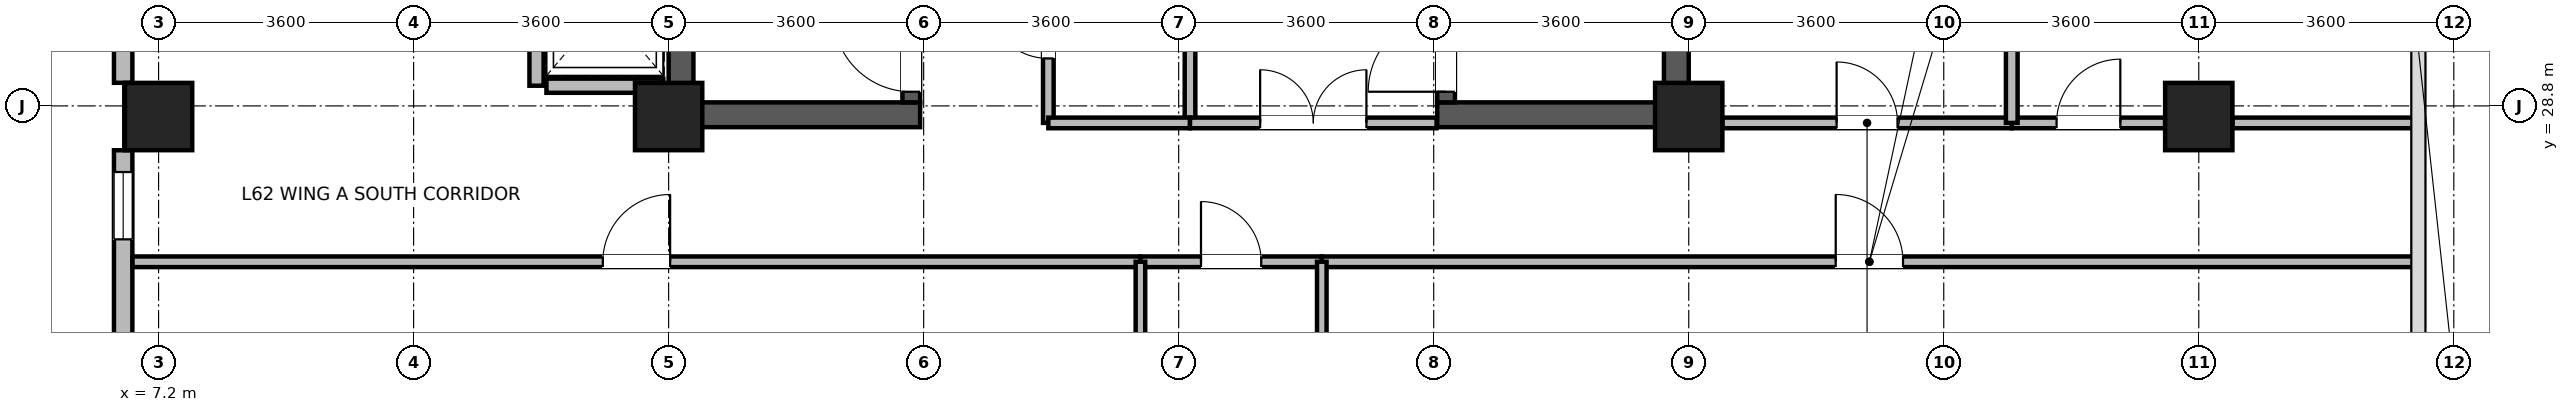
"""IFC4 building model, lengths in metres.
Left out: names, types, materials, properties, quantities, classifications, styles, units other than length and angle.
Written with IfcOpenShell. Run it as: python <this file> out.ifc"""

import sys

from ifc_helpers import new_model, si_unit, direction, frame, frame_2d, origin, origin_2d, place, context, subcontext, project, spatial, rectangle, extrude, source, transform, mapped, element, fill, save


model = new_model("IFC4")
c1 = context("Model", 3, precision=1e-05, world=origin(), true_north=direction((0.0, 1.0)))
c2 = subcontext(c1, "Body", "Model", "MODEL_VIEW")
j1 = project(units=[si_unit("LENGTHUNIT", "METRE"), si_unit("PLANEANGLEUNIT", "RADIAN")], contexts=[c1])
p1 = place(None, origin())
s1 = spatial("IfcSite", under=j1, at=p1, CompositionType="ELEMENT")
p2 = place(p1, origin())
s2 = spatial("IfcBuilding", under=s1, at=p2, CompositionType="ELEMENT")
p3 = place(p2, frame((0.0, 0.0, 242.5)))
s3 = spatial("IfcBuildingStorey", under=s2, at=p3, CompositionType="ELEMENT", Elevation=242.5)
for number, where, z_axis, x_axis in (
    (1, (14.575, 28.5, 0.0), (0.0, 0.0, 1.0), (0.0, 1.0, 0.0)),
    (2, (28.625, 28.5, 0.0), (0.0, 0.0, 1.0), (0.0, 1.0, 0.0)),
):
    element("IfcWall", number, at=place(p3, frame(where, z_axis=z_axis, x_axis=x_axis)), inside=s3, PredefinedType="SHEAR", context=c2, shape_type="SweptSolid", body=[
        extrude(rectangle(XDim=7.7, YDim=0.35, at=frame_2d((3.85, 0.0))), origin(), (0.0, 0.0, 1.0), 3.44),
    ])
for number, where, z_axis, x_axis in (
    (3, (14.75, 28.675, 0.0), (0.0, 0.0, 1.0), (1.0, 0.0, 0.0)),
    (4, (25.25, 28.675, 0.0), (0.0, 0.0, 1.0), (1.0, 0.0, 0.0)),
):
    element("IfcWall", number, at=place(p3, frame(where, z_axis=z_axis, x_axis=x_axis)), inside=s3, PredefinedType="SHEAR", context=c2, shape_type="SweptSolid", body=[
        extrude(rectangle(XDim=3.2, YDim=0.35, at=frame_2d((1.6, 0.0))), origin(), (0.0, 0.0, 1.0), 3.44),
    ])
p4 = place(p3, frame((17.825, 28.85, 0.0), z_axis=(0.0, 0.0, 1.0), x_axis=(0.0, 1.0, 0.0)))
e5 = element("IfcWall", 5, at=p4, inside=s3, PredefinedType="SHEAR", context=c2, shape_type="SweptSolid", body=[
    extrude(rectangle(XDim=7.0, YDim=0.25, at=frame_2d((3.5, 0.0))), origin(), (0.0, 0.0, 1.0), 3.44),
])
p5 = place(p4, frame((0.15, 0.0, 0.0)))
e6 = element("IfcOpeningElement", 6, at=p5, cuts=e5, PredefinedType="OPENING", context=c2, shape_type="SweptSolid", body=[
    extrude(rectangle(XDim=1.1, YDim=2.08, at=frame_2d((0.55, 1.04))), frame((0.0, 0.135, 0.0), z_axis=(0.0, -1.0, 0.0), x_axis=(1.0, 0.0, 0.0)), (0.0, 0.0, 1.0), 0.27),
])
p6 = place(p3, frame((25.375, 28.85, 0.0), z_axis=(0.0, 0.0, 1.0), x_axis=(0.0, 1.0, 0.0)))
e7 = element("IfcWall", 7, at=p6, inside=s3, PredefinedType="SHEAR", context=c2, shape_type="SweptSolid", body=[
    extrude(rectangle(XDim=7.0, YDim=0.25, at=frame_2d((3.5, 0.0))), origin(), (0.0, 0.0, 1.0), 3.44),
])
p7 = place(p6, frame((0.15, 0.0, 0.0)))
e8 = element("IfcOpeningElement", 8, at=p7, cuts=e7, PredefinedType="OPENING", context=c2, shape_type="SweptSolid", body=[
    extrude(rectangle(XDim=1.1, YDim=2.08, at=frame_2d((0.55, 1.04))), frame((0.0, 0.135, 0.0), z_axis=(0.0, -1.0, 0.0), x_axis=(1.0, 0.0, 0.0)), (0.0, 0.0, 1.0), 0.27),
])
m1 = source(origin(), c2, "Body", "SweptSolid", [
    extrude(rectangle(XDim=0.95, YDim=0.95, at=origin_2d()), origin(), (0.0, 0.0, 1.0), 3.7),
])
for number, where, z_axis, x_axis in (
    (9, (7.2, 28.65, 0.0), (0.0, 0.0, 1.0), (1.0, 0.0, 0.0)),
    (10, (14.4, 28.65, 0.0), (0.0, 0.0, 1.0), (1.0, 0.0, 0.0)),
    (11, (28.8, 28.65, 0.0), (0.0, 0.0, 1.0), (1.0, 0.0, 0.0)),
    (12, (36.0, 28.65, 0.0), (0.0, 0.0, 1.0), (1.0, 0.0, 0.0)),
):
    element("IfcColumn", number, at=place(p3, frame(where, z_axis=z_axis, x_axis=x_axis)), inside=s3, PredefinedType="COLUMN", context=c2, shape_type="MappedRepresentation", body=[
        mapped(m1, transform((0.0, 0.0, 0.0), x_axis=(1.0, 0.0, 0.0), y_axis=(0.0, 1.0, 0.0), z_axis=(0.0, 0.0, 1.0), scale=1.0)),
    ])
p8 = place(p3, frame((6.7, 29.126, 0.0), z_axis=(0.0, 0.0, 1.0), x_axis=(0.0, 1.0, 0.0)))
e13 = element("IfcWall", 13, at=p8, inside=s3, PredefinedType="STANDARD", context=c2, shape_type="SweptSolid", body=[
    extrude(rectangle(XDim=6.548, YDim=0.26, at=frame_2d((3.274, 0.0))), origin(), (0.0, 0.0, 1.0), 3.42),
])
p9 = place(p8, frame((1.037, 0.0, 0.85)))
e14 = element("IfcOpeningElement", 14, at=p9, cuts=e13, PredefinedType="OPENING", context=c2, shape_type="SweptSolid", body=[
    extrude(rectangle(XDim=1.2, YDim=1.75, at=frame_2d((0.6, 0.875))), frame((0.0, 0.14, 0.0), z_axis=(0.0, -1.0, 0.0), x_axis=(1.0, 0.0, 0.0)), (0.0, 0.0, 1.0), 0.28),
])
p10 = place(p8, frame((4.311, 0.0, 0.85)))
e15 = element("IfcOpeningElement", 15, at=p10, cuts=e13, PredefinedType="OPENING", context=c2, shape_type="SweptSolid", body=[
    extrude(rectangle(XDim=1.2, YDim=1.75, at=frame_2d((0.6, 0.875))), frame((0.0, 0.14, 0.0), z_axis=(0.0, -1.0, 0.0), x_axis=(1.0, 0.0, 0.0)), (0.0, 0.0, 1.0), 0.28),
])
p11 = place(p3, frame((6.7, 25.07, 0.0), z_axis=(0.0, 0.0, 1.0), x_axis=(0.0, 1.0, 0.0)))
e16 = element("IfcWall", 16, at=p11, inside=s3, PredefinedType="STANDARD", context=c2, shape_type="SweptSolid", body=[
    extrude(rectangle(XDim=3.104, YDim=0.26, at=frame_2d((1.552, 0.0))), origin(), (0.0, 0.0, 1.0), 3.42),
])
p12 = place(p11, frame((1.847, 0.0, 0.85)))
e17 = element("IfcOpeningElement", 17, at=p12, cuts=e16, PredefinedType="OPENING", context=c2, shape_type="SweptSolid", body=[
    extrude(rectangle(XDim=0.95, YDim=1.75, at=frame_2d((0.475, 0.875))), frame((0.0, 0.14, 0.0), z_axis=(0.0, -1.0, 0.0), x_axis=(1.0, 0.0, 0.0)), (0.0, 0.0, 1.0), 0.28),
])
p13 = place(p3, frame((12.675, 29.085, 0.0), z_axis=(0.0, 0.0, 1.0), x_axis=(1.0, 0.0, 0.0)))
e18 = element("IfcWall", 18, at=p13, inside=s3, PredefinedType="PARTITIONING", context=c2, shape_type="SweptSolid", body=[
    extrude(rectangle(XDim=1.65, YDim=0.2, at=frame_2d((0.825, 0.0))), origin(), (0.0, 0.0, 1.0), 3.42),
])
p14 = place(p3, frame((12.535, 29.085, 0.0), z_axis=(0.0, 0.0, 1.0), x_axis=(0.0, 1.0, 0.0)))
e19 = element("IfcWall", 19, at=p14, inside=s3, PredefinedType="PARTITIONING", context=c2, shape_type="SweptSolid", body=[
    extrude(rectangle(XDim=2.23, YDim=0.2, at=frame_2d((1.115, 0.0))), origin(), (0.0, 0.0, 1.0), 3.42),
])
p15 = place(p3, frame((23.62, 26.6, 0.0), z_axis=(0.0, 0.0, 1.0), x_axis=(1.0, 0.0, 0.0)))
e20 = element("IfcWall", 20, at=p15, inside=s3, PredefinedType="PARTITIONING", context=c2, shape_type="SweptSolid", body=[
    extrude(rectangle(XDim=15.46, YDim=0.15, at=frame_2d((7.73, 0.0))), origin(), (0.0, 0.0, 1.0), 3.42),
])
p16 = place(p15, frame((7.255, 0.0, 0.0)))
e21 = element("IfcOpeningElement", 21, at=p16, cuts=e20, PredefinedType="OPENING", context=c2, shape_type="SweptSolid", body=[
    extrude(rectangle(XDim=0.95, YDim=2.1, at=frame_2d((0.475, 1.05))), frame((0.0, 0.085, 0.0), z_axis=(0.0, -1.0, 0.0), x_axis=(1.0, 0.0, 0.0)), (0.0, 0.0, 1.0), 0.17),
])
p17 = place(p3, frame((6.832, 26.6, 0.0), z_axis=(0.0, 0.0, 1.0), x_axis=(1.0, 0.0, 0.0)))
e22 = element("IfcWall", 22, at=p17, inside=s3, PredefinedType="PARTITIONING", context=c2, shape_type="SweptSolid", body=[
    extrude(rectangle(XDim=14.228, YDim=0.15, at=frame_2d((7.114, 0.0))), origin(), (0.0, 0.0, 1.0), 3.42),
])
p18 = place(p17, frame((6.639, 0.0, 0.0)))
e23 = element("IfcOpeningElement", 23, at=p18, cuts=e22, PredefinedType="OPENING", context=c2, shape_type="SweptSolid", body=[
    extrude(rectangle(XDim=0.95, YDim=2.1, at=frame_2d((0.475, 1.05))), frame((0.0, 0.085, 0.0), z_axis=(0.0, -1.0, 0.0), x_axis=(1.0, 0.0, 0.0)), (0.0, 0.0, 1.0), 0.17),
])
p19 = place(p3, frame((33.36, 28.56, 0.0), z_axis=(0.0, 0.0, 1.0), x_axis=(1.0, 0.0, 0.0)))
e24 = element("IfcWall", 24, at=p19, inside=s3, PredefinedType="PARTITIONING", context=c2, shape_type="SweptSolid", body=[
    extrude(rectangle(XDim=2.165, YDim=0.15, at=frame_2d((1.083, 0.0))), origin(), (0.0, 0.0, 1.0), 2.87),
])
p20 = place(p19, frame((0.633, 0.0, 0.0)))
e25 = element("IfcOpeningElement", 25, at=p20, cuts=e24, PredefinedType="OPENING", context=c2, shape_type="SweptSolid", body=[
    extrude(rectangle(XDim=0.9, YDim=2.08, at=frame_2d((0.45, 1.04))), frame((0.0, 0.085, 0.0), z_axis=(0.0, -1.0, 0.0), x_axis=(1.0, 0.0, 0.0)), (0.0, 0.0, 1.0), 0.17),
])
p21 = place(p3, frame((36.475, 28.56, 0.0), z_axis=(0.0, 0.0, 1.0), x_axis=(1.0, 0.0, 0.0)))
e26 = element("IfcWall", 26, at=p21, inside=s3, PredefinedType="PARTITIONING", context=c2, shape_type="SweptSolid", body=[
    extrude(rectangle(XDim=2.605, YDim=0.15, at=frame_2d((1.302, 0.0))), origin(), (0.0, 0.0, 1.0), 3.42),
])
p22 = place(p3, frame((29.275, 28.56, 0.0), z_axis=(0.0, 0.0, 1.0), x_axis=(1.0, 0.0, 0.0)))
e27 = element("IfcWall", 27, at=p22, inside=s3, PredefinedType="PARTITIONING", context=c2, shape_type="SweptSolid", body=[
    extrude(rectangle(XDim=4.085, YDim=0.15, at=frame_2d((2.042, 0.0))), origin(), (0.0, 0.0, 1.0), 2.87),
])
p23 = place(p22, frame((1.613, 0.0, 0.0)))
e28 = element("IfcOpeningElement", 28, at=p23, cuts=e27, PredefinedType="OPENING", context=c2, shape_type="SweptSolid", body=[
    extrude(rectangle(XDim=0.86, YDim=2.02, at=frame_2d((0.43, 1.01))), frame((0.0, 0.085, 0.0), z_axis=(0.0, -1.0, 0.0), x_axis=(1.0, 0.0, 0.0)), (0.0, 0.0, 1.0), 0.17),
])
p24 = place(p3, frame((19.76, 28.56, 0.0), z_axis=(0.0, 0.0, 1.0), x_axis=(0.0, 1.0, 0.0)))
e29 = element("IfcWall", 29, at=p24, inside=s3, PredefinedType="PARTITIONING", context=c2, shape_type="SweptSolid", body=[
    extrude(rectangle(XDim=2.68, YDim=0.15, at=frame_2d((1.34, 0.0))), origin(), (0.0, 0.0, 1.0), 3.42),
])
p25 = place(p24, frame((0.91, 0.0, 0.0)))
e30 = element("IfcOpeningElement", 30, at=p25, cuts=e29, PredefinedType="OPENING", context=c2, shape_type="SweptSolid", body=[
    extrude(rectangle(XDim=0.86, YDim=2.02, at=frame_2d((0.43, 1.01))), frame((0.0, 0.085, 0.0), z_axis=(0.0, -1.0, 0.0), x_axis=(1.0, 0.0, 0.0)), (0.0, 0.0, 1.0), 0.17),
])
p26 = place(p3, frame((21.76, 28.56, 0.0), z_axis=(0.0, 0.0, 1.0), x_axis=(0.0, 1.0, 0.0)))
e31 = element("IfcWall", 31, at=p26, inside=s3, PredefinedType="PARTITIONING", context=c2, shape_type="SweptSolid", body=[
    extrude(rectangle(XDim=2.68, YDim=0.15, at=frame_2d((1.34, 0.0))), origin(), (0.0, 0.0, 1.0), 3.42),
])
p27 = place(p3, frame((21.06, 26.6, 0.0), z_axis=(0.0, 0.0, 1.0), x_axis=(1.0, 0.0, 0.0)))
e32 = element("IfcWall", 32, at=p27, inside=s3, PredefinedType="PARTITIONING", context=c2, shape_type="SweptSolid", body=[
    extrude(rectangle(XDim=2.56, YDim=0.15, at=frame_2d((1.28, 0.0))), origin(), (0.0, 0.0, 1.0), 3.42),
])
p28 = place(p27, frame((0.855, 0.0, 0.0)))
e33 = element("IfcOpeningElement", 33, at=p28, cuts=e32, PredefinedType="OPENING", context=c2, shape_type="SweptSolid", body=[
    extrude(rectangle(XDim=0.85, YDim=2.04, at=frame_2d((0.425, 1.02))), frame((0.0, 0.085, 0.0), z_axis=(0.0, -1.0, 0.0), x_axis=(1.0, 0.0, 0.0)), (0.0, 0.0, 1.0), 0.17),
])
p29 = place(p3, frame((19.76, 28.56, 0.0), z_axis=(0.0, 0.0, 1.0), x_axis=(1.0, 0.0, 0.0)))
e34 = element("IfcWall", 34, at=p29, inside=s3, PredefinedType="PARTITIONING", context=c2, shape_type="SweptSolid", body=[
    extrude(rectangle(XDim=2.0, YDim=0.15, at=frame_2d((1.0, 0.0))), origin(), (0.0, 0.0, 1.0), 2.52),
])
for number, where, z_axis, x_axis in (
    (35, (21.06, 21.732, 0.0), (0.0, 0.0, 1.0), (0.0, 1.0, 0.0)),
    (36, (23.62, 21.732, 0.0), (0.0, 0.0, 1.0), (0.0, 1.0, 0.0)),
):
    element("IfcWall", number, at=place(p3, frame(where, z_axis=z_axis, x_axis=x_axis)), inside=s3, PredefinedType="PARTITIONING", context=c2, shape_type="SweptSolid", body=[
        extrude(rectangle(XDim=4.868, YDim=0.135, at=frame_2d((2.434, 0.0))), origin(), (0.0, 0.0, 1.0), 3.42),
    ])
p30 = place(p3, frame((21.76, 28.56, 0.0), z_axis=(0.0, 0.0, 1.0), x_axis=(1.0, 0.0, 0.0)))
e37 = element("IfcWall", 37, at=p30, inside=s3, PredefinedType="PARTITIONING", context=c2, shape_type="SweptSolid", body=[
    extrude(rectangle(XDim=3.48, YDim=0.15, at=frame_2d((1.74, 0.0))), origin(), (0.0, 0.0, 1.0), 2.52),
])
p31 = place(p30, frame((0.99, 0.0, 0.0)))
e38 = element("IfcOpeningElement", 38, at=p31, cuts=e37, PredefinedType="OPENING", context=c2, shape_type="SweptSolid", body=[
    extrude(rectangle(XDim=1.5, YDim=2.1, at=frame_2d((0.75, 1.05))), frame((0.0, 0.085, 0.0), z_axis=(0.0, -1.0, 0.0), x_axis=(1.0, 0.0, 0.0)), (0.0, 0.0, 1.0), 0.17),
])
p32 = place(p3, frame((33.36, 28.56, 0.0), z_axis=(0.0, 0.0, 1.0), x_axis=(0.0, 1.0, 0.0)))
e39 = element("IfcWall", 39, at=p32, inside=s3, PredefinedType="PARTITIONING", context=c2, shape_type="SweptSolid", body=[
    extrude(rectangle(XDim=3.08, YDim=0.165, at=frame_2d((1.54, 0.0))), origin(), (0.0, 0.0, 1.0), 3.42),
])
p33 = place(p12, origin())
e40 = element("IfcWindow", 40, at=p33, inside=s3, PartitioningType="SINGLE_PANEL", PredefinedType="WINDOW", context=c2, shape_type="SweptSolid", body=[
    extrude(rectangle(XDim=0.95, YDim=1.75, at=frame_2d((0.475, 0.875))), frame((0.0, 0.03, 0.0), z_axis=(0.0, -1.0, 0.0), x_axis=(1.0, 0.0, 0.0)), (0.0, 0.0, 1.0), 0.06),
])
fill(e17, e40)
p34 = place(p5, origin())
e41 = element("IfcDoor", 41, at=p34, inside=s3, OperationType="SINGLE_SWING_RIGHT", PredefinedType="DOOR", context=c2, shape_type="SweptSolid", body=[
    extrude(rectangle(XDim=1.1, YDim=2.08, at=frame_2d((0.55, 1.04))), frame((0.0, 0.025, 0.0), z_axis=(0.0, -1.0, 0.0), x_axis=(1.0, 0.0, 0.0)), (0.0, 0.0, 1.0), 0.05),
])
fill(e6, e41)
p35 = place(p7, origin())
e42 = element("IfcDoor", 42, at=p35, inside=s3, OperationType="SINGLE_SWING_LEFT", PredefinedType="DOOR", context=c2, shape_type="SweptSolid", body=[
    extrude(rectangle(XDim=1.1, YDim=2.08, at=frame_2d((0.55, 1.04))), frame((0.0, 0.025, 0.0), z_axis=(0.0, -1.0, 0.0), x_axis=(1.0, 0.0, 0.0)), (0.0, 0.0, 1.0), 0.05),
])
fill(e8, e42)
p36 = place(p16, origin())
e43 = element("IfcDoor", 43, at=p36, inside=s3, OperationType="SINGLE_SWING_LEFT", PredefinedType="DOOR", context=c2, shape_type="SweptSolid", body=[
    extrude(rectangle(XDim=0.95, YDim=2.1, at=frame_2d((0.475, 1.05))), frame((0.0, 0.025, 0.0), z_axis=(0.0, -1.0, 0.0), x_axis=(1.0, 0.0, 0.0)), (0.0, 0.0, 1.0), 0.05),
])
fill(e21, e43)
p37 = place(p18, origin())
e44 = element("IfcDoor", 44, at=p37, inside=s3, OperationType="SINGLE_SWING_RIGHT", PredefinedType="DOOR", context=c2, shape_type="SweptSolid", body=[
    extrude(rectangle(XDim=0.95, YDim=2.1, at=frame_2d((0.475, 1.05))), frame((0.0, 0.025, 0.0), z_axis=(0.0, -1.0, 0.0), x_axis=(1.0, 0.0, 0.0)), (0.0, 0.0, 1.0), 0.05),
])
fill(e23, e44)
p38 = place(p20, origin())
e45 = element("IfcDoor", 45, at=p38, inside=s3, OperationType="SINGLE_SWING_RIGHT", PredefinedType="DOOR", context=c2, shape_type="SweptSolid", body=[
    extrude(rectangle(XDim=0.9, YDim=2.08, at=frame_2d((0.45, 1.04))), frame((0.0, 0.025, 0.0), z_axis=(0.0, -1.0, 0.0), x_axis=(1.0, 0.0, 0.0)), (0.0, 0.0, 1.0), 0.05),
])
fill(e25, e45)
p39 = place(p23, origin())
e46 = element("IfcDoor", 46, at=p39, inside=s3, OperationType="SINGLE_SWING_LEFT", PredefinedType="DOOR", context=c2, shape_type="SweptSolid", body=[
    extrude(rectangle(XDim=0.86, YDim=2.02, at=frame_2d((0.43, 1.01))), frame((0.0, 0.025, 0.0), z_axis=(0.0, -1.0, 0.0), x_axis=(1.0, 0.0, 0.0)), (0.0, 0.0, 1.0), 0.05),
])
fill(e28, e46)
p40 = place(p25, origin())
e47 = element("IfcDoor", 47, at=p40, inside=s3, OperationType="SINGLE_SWING_RIGHT", PredefinedType="DOOR", context=c2, shape_type="SweptSolid", body=[
    extrude(rectangle(XDim=0.86, YDim=2.02, at=frame_2d((0.43, 1.01))), frame((0.0, 0.025, 0.0), z_axis=(0.0, -1.0, 0.0), x_axis=(1.0, 0.0, 0.0)), (0.0, 0.0, 1.0), 0.05),
])
fill(e30, e47)
p41 = place(p28, origin())
e48 = element("IfcDoor", 48, at=p41, inside=s3, OperationType="SINGLE_SWING_LEFT", PredefinedType="DOOR", context=c2, shape_type="SweptSolid", body=[
    extrude(rectangle(XDim=0.85, YDim=2.04, at=frame_2d((0.425, 1.02))), frame((0.0, 0.025, 0.0), z_axis=(0.0, -1.0, 0.0), x_axis=(1.0, 0.0, 0.0)), (0.0, 0.0, 1.0), 0.05),
])
fill(e33, e48)
p42 = place(p31, origin())
e49 = element("IfcDoor", 49, at=p42, inside=s3, OperationType="DOUBLE_DOOR_SINGLE_SWING", PredefinedType="DOOR", context=c2, shape_type="SweptSolid", body=[
    extrude(rectangle(XDim=1.5, YDim=2.1, at=frame_2d((0.75, 1.05))), frame((0.0, 0.025, 0.0), z_axis=(0.0, -1.0, 0.0), x_axis=(1.0, 0.0, 0.0)), (0.0, 0.0, 1.0), 0.05),
])
fill(e38, e49)
save(model, sys.argv[1])
